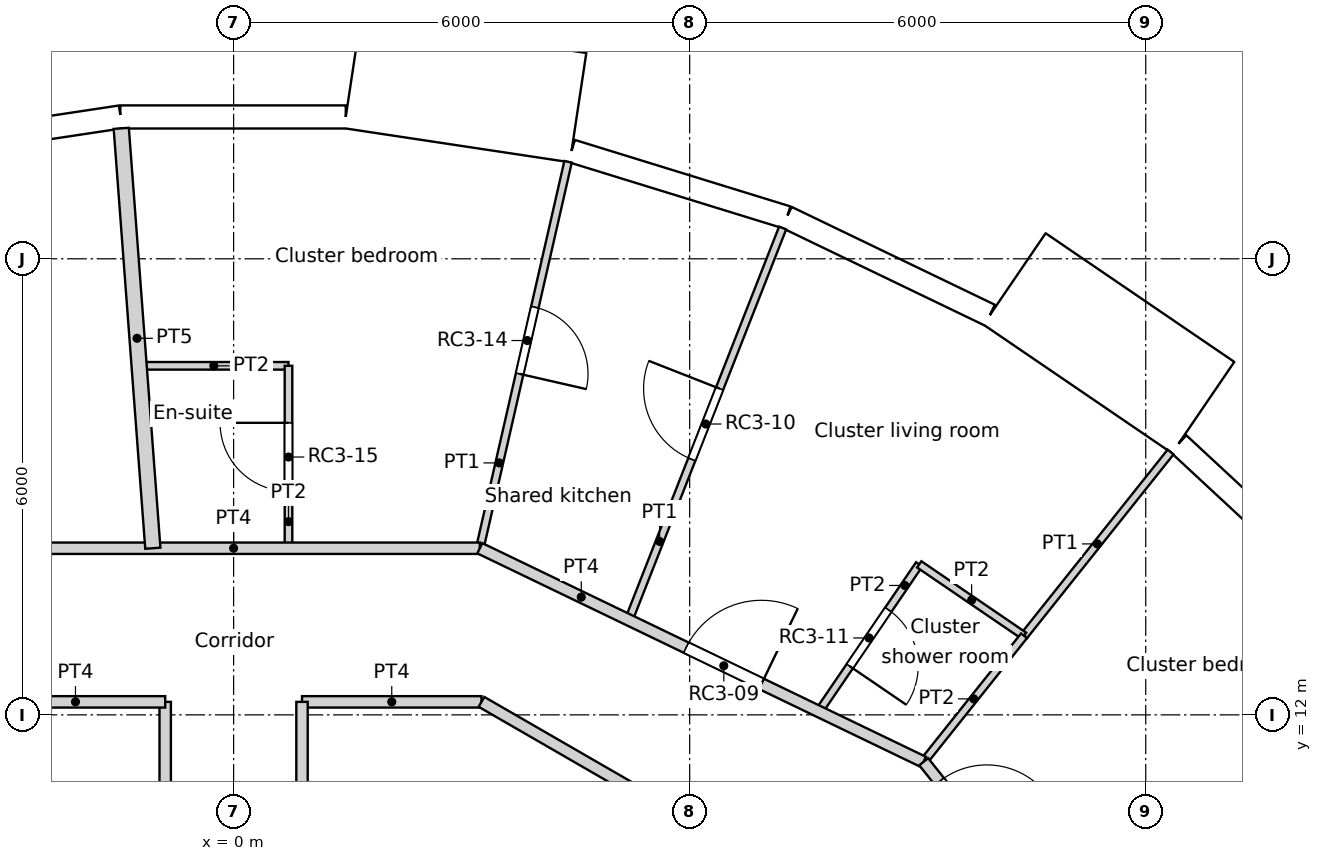
"""IFC4 building model, lengths in metres.
Left out: names, types, materials, properties, quantities, classifications, styles, units other than length and angle.
Written with IfcOpenShell. Run it as: python <this file> out.ifc"""

import sys

from ifc_helpers import new_model, si_unit, direction, frame, frame_2d, origin, origin_2d, place, context, subcontext, project, spatial, rectangle, circle, extrude, element, fill, save


model = new_model("IFC4")
c1 = context("Model", 3, precision=1e-05, world=origin(), true_north=direction((0.0, 1.0)))
c2 = subcontext(c1, "Body", "Model", "MODEL_VIEW")
j1 = project(units=[si_unit("LENGTHUNIT", "METRE"), si_unit("PLANEANGLEUNIT", "RADIAN")], contexts=[c1])
p1 = place(None, origin())
s1 = spatial("IfcSite", under=j1, at=p1, CompositionType="ELEMENT")
p2 = place(p1, origin())
s2 = spatial("IfcBuilding", under=s1, at=p2, CompositionType="ELEMENT")
p3 = place(p2, frame((0.0, 0.0, 252.6)))
s3 = spatial("IfcBuildingStorey", under=s2, at=p3, CompositionType="ELEMENT", Elevation=252.6)
for number, where, z_axis, x_axis in (
    (1, (11.735, 14.716, 0.0), (0.0, 0.0, 1.0), (1.0, 0.0, 0.0)),
    (2, (6.876, 17.521, 0.0), (0.0, 0.0, 1.0), (1.0, 0.0, 0.0)),
    (3, (1.406, 18.77, 0.0), (0.0, 0.0, 1.0), (1.0, 0.0, 0.0)),
):
    element("IfcColumn", number, at=place(p3, frame(where, z_axis=z_axis, x_axis=x_axis)), inside=s3, PredefinedType="COLUMN", context=c2, shape_type="SweptSolid", body=[
        extrude(circle(Radius=0.55, at=origin_2d()), origin(), (0.0, 0.0, 1.0), 3.6),
    ])
p4 = place(p3, frame((14.604, 13.55, 0.0), z_axis=(0.0, 0.0, 1.0), x_axis=(-0.733066412643, 0.680157066165, 0.0)))
e4 = element("IfcWall", 4, at=p4, inside=s3, PredefinedType="SOLIDWALL", context=c2, shape_type="SweptSolid", body=[
    extrude(rectangle(XDim=2.962, YDim=0.3, at=frame_2d((1.481, 0.0))), origin(), (0.0, 0.0, 1.0), 3.25),
])
p5 = place(p4, frame((1.481, 0.0, 1.55)))
e5 = element("IfcOpeningElement", 5, at=p5, cuts=e4, PredefinedType="OPENING", context=c2, shape_type="SweptSolid", body=[
    extrude(circle(Radius=0.9, at=origin_2d()), frame((0.0, 0.16, 0.0), z_axis=(0.0, -1.0, 0.0), x_axis=(1.0, 0.0, 0.0)), (0.0, 0.0, 1.0), 0.32),
])
p6 = place(p3, frame((12.754, 16.044, -0.35), z_axis=(0.0, 0.0, 1.0), x_axis=(-0.826246281157, 0.563309047392, 0.0)))
e6 = element("IfcWall", 6, at=p6, inside=s3, PredefinedType="ELEMENTEDWALL", context=c2, shape_type="SweptSolid", body=[
    extrude(rectangle(XDim=3.0, YDim=1.45, at=frame_2d((1.5, 0.0))), origin(), (0.0, 0.0, 1.0), 3.6),
])
p7 = place(p6, frame((1.5, 0.0, 1.9)))
e7 = element("IfcOpeningElement", 7, at=p7, cuts=e6, PredefinedType="OPENING", context=c2, shape_type="SweptSolid", body=[
    extrude(circle(Radius=0.9, at=origin_2d()), frame((0.0, 0.735, 0.0), z_axis=(0.0, -1.0, 0.0), x_axis=(1.0, 0.0, 0.0)), (0.0, 0.0, 1.0), 1.47),
])
p8 = place(p3, frame((9.947, 17.259, 0.0), z_axis=(0.0, 0.0, 1.0), x_axis=(-0.900939615635, 0.433944476838, 0.0)))
e8 = element("IfcWall", 8, at=p8, inside=s3, PredefinedType="SOLIDWALL", context=c2, shape_type="SweptSolid", body=[
    extrude(rectangle(XDim=2.962, YDim=0.3, at=frame_2d((1.481, 0.0))), origin(), (0.0, 0.0, 1.0), 3.25),
])
p9 = place(p8, frame((1.481, 0.0, 1.55)))
e9 = element("IfcOpeningElement", 9, at=p9, cuts=e8, PredefinedType="OPENING", context=c2, shape_type="SweptSolid", body=[
    extrude(circle(Radius=0.9, at=origin_2d()), frame((0.0, 0.16, 0.0), z_axis=(0.0, -1.0, 0.0), x_axis=(1.0, 0.0, 0.0)), (0.0, 0.0, 1.0), 0.32),
])
p10 = place(p3, frame((7.278, 18.545, 0.0), z_axis=(0.0, 0.0, 1.0), x_axis=(-0.95558635705, 0.294711238707, 0.0)))
e10 = element("IfcWall", 10, at=p10, inside=s3, PredefinedType="SOLIDWALL", context=c2, shape_type="SweptSolid", body=[
    extrude(rectangle(XDim=2.962, YDim=0.3, at=frame_2d((1.481, 0.0))), origin(), (0.0, 0.0, 1.0), 3.25),
])
p11 = place(p10, frame((1.481, 0.0, 1.55)))
e11 = element("IfcOpeningElement", 11, at=p11, cuts=e10, PredefinedType="OPENING", context=c2, shape_type="SweptSolid", body=[
    extrude(circle(Radius=0.9, at=origin_2d()), frame((0.0, 0.16, 0.0), z_axis=(0.0, -1.0, 0.0), x_axis=(1.0, 0.0, 0.0)), (0.0, 0.0, 1.0), 0.32),
])
p12 = place(p3, frame((4.53, 19.989, -0.35), z_axis=(0.0, 0.0, 1.0), x_axis=(-0.988836445254, 0.149004981587, 0.0)))
e12 = element("IfcWall", 12, at=p12, inside=s3, PredefinedType="ELEMENTEDWALL", context=c2, shape_type="SweptSolid", body=[
    extrude(rectangle(XDim=3.0, YDim=1.45, at=frame_2d((1.5, 0.0))), origin(), (0.0, 0.0, 1.0), 3.6),
])
p13 = place(p12, frame((1.5, 0.0, 1.9)))
e13 = element("IfcOpeningElement", 13, at=p13, cuts=e12, PredefinedType="OPENING", context=c2, shape_type="SweptSolid", body=[
    extrude(circle(Radius=0.9, at=origin_2d()), frame((0.0, 0.735, 0.0), z_axis=(0.0, -1.0, 0.0), x_axis=(1.0, 0.0, 0.0)), (0.0, 0.0, 1.0), 1.47),
])
p14 = place(p3, frame((1.473, 19.866, 0.0), z_axis=(0.0, 0.0, 1.0), x_axis=(-1.0, 0.0, 0.0)))
e14 = element("IfcWall", 14, at=p14, inside=s3, PredefinedType="SOLIDWALL", context=c2, shape_type="SweptSolid", body=[
    extrude(rectangle(XDim=2.962, YDim=0.3, at=frame_2d((1.481, 0.0))), origin(), (0.0, 0.0, 1.0), 3.25),
])
p15 = place(p14, frame((1.481, 0.0, 1.55)))
e15 = element("IfcOpeningElement", 15, at=p15, cuts=e14, PredefinedType="OPENING", context=c2, shape_type="SweptSolid", body=[
    extrude(circle(Radius=0.9, at=origin_2d()), frame((0.0, 0.16, 0.0), z_axis=(0.0, -1.0, 0.0), x_axis=(1.0, 0.0, 0.0)), (0.0, 0.0, 1.0), 0.32),
])
p16 = place(p3, frame((-1.489, 19.866, 0.0), z_axis=(0.0, 0.0, 1.0), x_axis=(-0.988835775663, -0.149009425104, 0.0)))
e16 = element("IfcWall", 16, at=p16, inside=s3, PredefinedType="SOLIDWALL", context=c2, shape_type="SweptSolid", body=[
    extrude(rectangle(XDim=2.962, YDim=0.3, at=frame_2d((1.481, 0.0))), origin(), (0.0, 0.0, 1.0), 3.25),
])
p17 = place(p16, frame((1.481, 0.0, 1.55)))
e17 = element("IfcOpeningElement", 17, at=p17, cuts=e16, PredefinedType="OPENING", context=c2, shape_type="SweptSolid", body=[
    extrude(circle(Radius=0.9, at=origin_2d()), frame((0.0, 0.16, 0.0), z_axis=(0.0, -1.0, 0.0), x_axis=(1.0, 0.0, 0.0)), (0.0, 0.0, 1.0), 0.32),
])
p18 = place(p3, frame((9.079, 11.384, 0.0), z_axis=(0.0, 0.0, 1.0), x_axis=(0.623165080354, -0.782090328944, 0.0)))
e18 = element("IfcWall", 18, at=p18, inside=s3, PredefinedType="PARTITIONING", context=c2, shape_type="SweptSolid", body=[
    extrude(rectangle(XDim=3.564, YDim=0.15, at=frame_2d((1.782, 0.0))), origin(), (0.0, 0.0, 1.0), 3.25),
])
p19 = place(p18, frame((0.332, 0.0, 0.0)))
e19 = element("IfcOpeningElement", 19, at=p19, cuts=e18, PredefinedType="OPENING", context=c2, shape_type="SweptSolid", body=[
    extrude(rectangle(XDim=1.0, YDim=2.1, at=frame_2d((0.5, 1.05))), frame((0.0, 0.075, 0.0), z_axis=(0.0, -1.0, 0.0), x_axis=(1.0, 0.0, 0.0)), (0.0, 0.0, 1.0), 0.15),
])
p20 = place(p3, frame((-0.9, 8.8, 0.0), z_axis=(0.0, 0.0, 1.0), x_axis=(0.0, 1.0, 0.0)))
e20 = element("IfcWall", 20, at=p20, inside=s3, PredefinedType="PARTITIONING", context=c2, shape_type="SweptSolid", body=[
    extrude(rectangle(XDim=3.371, YDim=0.15, at=frame_2d((1.686, 0.0))), origin(), (0.0, 0.0, 1.0), 3.25),
])
p21 = place(p3, frame((-3.261, 12.171, 0.0), z_axis=(0.0, 0.0, 1.0), x_axis=(1.0, 0.0, 0.0)))
e21 = element("IfcWall", 21, at=p21, inside=s3, PredefinedType="PARTITIONING", context=c2, shape_type="SweptSolid", body=[
    extrude(rectangle(XDim=2.361, YDim=0.15, at=frame_2d((1.181, 0.0))), origin(), (0.0, 0.0, 1.0), 3.25),
])
p22 = place(p3, frame((3.261, 12.171, 0.0), z_axis=(0.0, 0.0, 1.0), x_axis=(0.866066809554, -0.499928276245, 0.0)))
e22 = element("IfcWall", 22, at=p22, inside=s3, PredefinedType="PARTITIONING", context=c2, shape_type="SweptSolid", body=[
    extrude(rectangle(XDim=6.743, YDim=0.15, at=frame_2d((3.371, 0.0))), origin(), (0.0, 0.0, 1.0), 3.25),
])
p23 = place(p3, frame((0.9, 12.171, 0.0), z_axis=(0.0, 0.0, 1.0), x_axis=(1.0, 0.0, 0.0)))
e23 = element("IfcWall", 23, at=p23, inside=s3, PredefinedType="PARTITIONING", context=c2, shape_type="SweptSolid", body=[
    extrude(rectangle(XDim=2.361, YDim=0.15, at=frame_2d((1.181, 0.0))), origin(), (0.0, 0.0, 1.0), 3.25),
])
p24 = place(p3, frame((0.9, 8.8, 0.0), z_axis=(0.0, 0.0, 1.0), x_axis=(0.0, 1.0, 0.0)))
e24 = element("IfcWall", 24, at=p24, inside=s3, PredefinedType="PARTITIONING", context=c2, shape_type="SweptSolid", body=[
    extrude(rectangle(XDim=3.371, YDim=0.15, at=frame_2d((1.686, 0.0))), origin(), (0.0, 0.0, 1.0), 3.25),
])
p25 = place(p3, frame((3.239, 14.192, 0.0), z_axis=(0.0, 0.0, 1.0), x_axis=(0.90093183072, -0.433960639224, 0.0)))
e25 = element("IfcWall", 25, at=p25, inside=s3, PredefinedType="PARTITIONING", context=c2, shape_type="SweptSolid", body=[
    extrude(rectangle(XDim=6.479, YDim=0.15, at=frame_2d((3.239, 0.0))), origin(), (0.0, 0.0, 1.0), 3.25),
])
p26 = place(p25, frame((3.013, 0.0, 0.0)))
e26 = element("IfcOpeningElement", 26, at=p26, cuts=e25, PredefinedType="OPENING", context=c2, shape_type="SweptSolid", body=[
    extrude(rectangle(XDim=1.1, YDim=2.1, at=frame_2d((0.55, 1.05))), frame((0.0, 0.075, 0.0), z_axis=(0.0, -1.0, 0.0), x_axis=(1.0, 0.0, 0.0)), (0.0, 0.0, 1.0), 0.15),
])
p27 = place(p3, frame((-3.239, 14.192, 0.0), z_axis=(0.0, 0.0, 1.0), x_axis=(1.0, 0.0, 0.0)))
e27 = element("IfcWall", 27, at=p27, inside=s3, PredefinedType="PARTITIONING", context=c2, shape_type="SweptSolid", body=[
    extrude(rectangle(XDim=6.478, YDim=0.15, at=frame_2d((3.239, 0.0))), origin(), (0.0, 0.0, 1.0), 3.25),
])
p28 = place(p3, frame((5.199, 13.248, 0.0), z_axis=(0.0, 0.0, 1.0), x_axis=(0.365334662456, 0.930876245485, 0.0)))
e28 = element("IfcWall", 28, at=p28, inside=s3, PredefinedType="PARTITIONING", context=c2, shape_type="SweptSolid", body=[
    extrude(rectangle(XDim=5.54, YDim=0.1, at=frame_2d((2.77, 0.0))), origin(), (0.0, 0.0, 1.0), 3.25),
])
p29 = place(p28, frame((2.27, 0.0, 0.0)))
e29 = element("IfcOpeningElement", 29, at=p29, cuts=e28, PredefinedType="OPENING", context=c2, shape_type="SweptSolid", body=[
    extrude(rectangle(XDim=1.0, YDim=2.04, at=frame_2d((0.5, 1.02))), frame((0.0, 0.05, 0.0), z_axis=(0.0, -1.0, 0.0), x_axis=(1.0, 0.0, 0.0)), (0.0, 0.0, 1.0), 0.1),
])
p30 = place(p3, frame((9.02, 13.98, 0.0), z_axis=(0.0, 0.0, 1.0), x_axis=(0.826289240924, -0.563246030021, 0.0)))
e30 = element("IfcWall", 30, at=p30, inside=s3, PredefinedType="PARTITIONING", context=c2, shape_type="SweptSolid", body=[
    extrude(rectangle(XDim=1.669, YDim=0.1, at=frame_2d((0.834, 0.0))), origin(), (0.0, 0.0, 1.0), 3.25),
])
p31 = place(p3, frame((7.7, 12.044, 0.0), z_axis=(0.0, 0.0, 1.0), x_axis=(0.563349756349, 0.826218525586, 0.0)))
e31 = element("IfcWall", 31, at=p31, inside=s3, PredefinedType="PARTITIONING", context=c2, shape_type="SweptSolid", body=[
    extrude(rectangle(XDim=2.343, YDim=0.1, at=frame_2d((1.172, 0.0))), origin(), (0.0, 0.0, 1.0), 3.25),
])
p32 = place(p31, frame((0.721, 0.0, 0.0)))
e32 = element("IfcOpeningElement", 32, at=p32, cuts=e31, PredefinedType="OPENING", context=c2, shape_type="SweptSolid", body=[
    extrude(rectangle(XDim=0.9, YDim=2.0, at=frame_2d((0.45, 1.0))), frame((0.0, 0.05, 0.0), z_axis=(0.0, -1.0, 0.0), x_axis=(1.0, 0.0, 0.0)), (0.0, 0.0, 1.0), 0.1),
])
p33 = place(p3, frame((10.399, 13.04, 0.0), z_axis=(0.0, 0.0, 1.0), x_axis=(0.62343302941, 0.781876753613, 0.0)))
e33 = element("IfcWall", 33, at=p33, inside=s3, PredefinedType="PARTITIONING", context=c2, shape_type="SweptSolid", body=[
    extrude(rectangle(XDim=3.093, YDim=0.1, at=frame_2d((1.546, 0.0))), origin(), (0.0, 0.0, 1.0), 3.25),
])
p34 = place(p3, frame((3.239, 14.192, 0.0), z_axis=(0.0, 0.0, 1.0), x_axis=(0.222612505682, 0.974907007008, 0.0)))
e34 = element("IfcWall", 34, at=p34, inside=s3, PredefinedType="PARTITIONING", context=c2, shape_type="SweptSolid", body=[
    extrude(rectangle(XDim=5.215, YDim=0.1, at=frame_2d((2.607, 0.0))), origin(), (0.0, 0.0, 1.0), 3.25),
])
p35 = place(p34, frame((2.353, 0.0, 0.0)))
e35 = element("IfcOpeningElement", 35, at=p35, cuts=e34, PredefinedType="OPENING", context=c2, shape_type="SweptSolid", body=[
    extrude(rectangle(XDim=0.9, YDim=2.1, at=frame_2d((0.45, 1.05))), frame((0.0, 0.05, 0.0), z_axis=(0.0, -1.0, 0.0), x_axis=(1.0, 0.0, 0.0)), (0.0, 0.0, 1.0), 0.1),
])
p36 = place(p3, frame((9.076, 11.381, 0.0), z_axis=(0.0, 0.0, 1.0), x_axis=(0.623501640025, 0.781822041699, 0.0)))
e36 = element("IfcWall", 36, at=p36, inside=s3, PredefinedType="PARTITIONING", context=c2, shape_type="SweptSolid", body=[
    extrude(rectangle(XDim=2.122, YDim=0.1, at=frame_2d((1.061, 0.0))), origin(), (0.0, 0.0, 1.0), 3.25),
])
p37 = place(p3, frame((0.722, 14.192, 0.0), z_axis=(0.0, 0.0, 1.0), x_axis=(0.0, 1.0, 0.0)))
e37 = element("IfcWall", 37, at=p37, inside=s3, PredefinedType="PARTITIONING", context=c2, shape_type="SweptSolid", body=[
    extrude(rectangle(XDim=2.4, YDim=0.1, at=frame_2d((1.2, 0.0))), origin(), (0.0, 0.0, 1.0), 3.25),
])
p38 = place(p37, frame((0.75, 0.0, 0.0)))
e38 = element("IfcOpeningElement", 38, at=p38, cuts=e37, PredefinedType="OPENING", context=c2, shape_type="SweptSolid", body=[
    extrude(rectangle(XDim=0.9, YDim=2.04, at=frame_2d((0.45, 1.02))), frame((0.0, 0.05, 0.0), z_axis=(0.0, -1.0, 0.0), x_axis=(1.0, 0.0, 0.0)), (0.0, 0.0, 1.0), 0.1),
])
p39 = place(p3, frame((-1.243, 16.592, 0.0), z_axis=(0.0, 0.0, 1.0), x_axis=(1.0, 0.0, 0.0)))
e39 = element("IfcWall", 39, at=p39, inside=s3, PredefinedType="PARTITIONING", context=c2, shape_type="SweptSolid", body=[
    extrude(rectangle(XDim=1.965, YDim=0.1, at=frame_2d((0.982, 0.0))), origin(), (0.0, 0.0, 1.0), 3.25),
])
p40 = place(p3, frame((-1.478, 19.716, 0.0), z_axis=(0.0, 0.0, 1.0), x_axis=(0.075011267216, -0.997182686267, 0.0)))
e40 = element("IfcWall", 40, at=p40, inside=s3, PredefinedType="PARTITIONING", context=c2, shape_type="SweptSolid", body=[
    extrude(rectangle(XDim=5.54, YDim=0.2, at=frame_2d((2.77, 0.0))), origin(), (0.0, 0.0, 1.0), 3.25),
])
p41 = place(p5, origin())
e41 = element("IfcWindow", 41, at=p41, inside=s3, PartitioningType="SINGLE_PANEL", PredefinedType="WINDOW", context=c2, shape_type="SweptSolid", body=[
    extrude(circle(Radius=0.9, at=origin_2d()), frame((0.0, 0.12, 0.0), z_axis=(0.0, -1.0, 0.0), x_axis=(1.0, 0.0, 0.0)), (0.0, 0.0, 1.0), 0.1),
])
fill(e5, e41)
p42 = place(p7, origin())
e42 = element("IfcWindow", 42, at=p42, inside=s3, PartitioningType="SINGLE_PANEL", PredefinedType="WINDOW", context=c2, shape_type="SweptSolid", body=[
    extrude(circle(Radius=0.9, at=origin_2d()), frame((0.0, 0.695, 0.0), z_axis=(0.0, -1.0, 0.0), x_axis=(1.0, 0.0, 0.0)), (0.0, 0.0, 1.0), 0.1),
])
fill(e7, e42)
p43 = place(p9, origin())
e43 = element("IfcWindow", 43, at=p43, inside=s3, PartitioningType="SINGLE_PANEL", PredefinedType="WINDOW", context=c2, shape_type="SweptSolid", body=[
    extrude(circle(Radius=0.9, at=origin_2d()), frame((0.0, 0.12, 0.0), z_axis=(0.0, -1.0, 0.0), x_axis=(1.0, 0.0, 0.0)), (0.0, 0.0, 1.0), 0.1),
])
fill(e9, e43)
p44 = place(p11, origin())
e44 = element("IfcWindow", 44, at=p44, inside=s3, PartitioningType="SINGLE_PANEL", PredefinedType="WINDOW", context=c2, shape_type="SweptSolid", body=[
    extrude(circle(Radius=0.9, at=origin_2d()), frame((0.0, 0.12, 0.0), z_axis=(0.0, -1.0, 0.0), x_axis=(1.0, 0.0, 0.0)), (0.0, 0.0, 1.0), 0.1),
])
fill(e11, e44)
p45 = place(p13, origin())
e45 = element("IfcWindow", 45, at=p45, inside=s3, PartitioningType="SINGLE_PANEL", PredefinedType="WINDOW", context=c2, shape_type="SweptSolid", body=[
    extrude(circle(Radius=0.9, at=origin_2d()), frame((0.0, 0.695, 0.0), z_axis=(0.0, -1.0, 0.0), x_axis=(1.0, 0.0, 0.0)), (0.0, 0.0, 1.0), 0.1),
])
fill(e13, e45)
p46 = place(p15, origin())
e46 = element("IfcWindow", 46, at=p46, inside=s3, PartitioningType="SINGLE_PANEL", PredefinedType="WINDOW", context=c2, shape_type="SweptSolid", body=[
    extrude(circle(Radius=0.9, at=origin_2d()), frame((0.0, 0.12, 0.0), z_axis=(0.0, -1.0, 0.0), x_axis=(1.0, 0.0, 0.0)), (0.0, 0.0, 1.0), 0.1),
])
fill(e15, e46)
p47 = place(p17, origin())
e47 = element("IfcWindow", 47, at=p47, inside=s3, PartitioningType="SINGLE_PANEL", PredefinedType="WINDOW", context=c2, shape_type="SweptSolid", body=[
    extrude(circle(Radius=0.9, at=origin_2d()), frame((0.0, 0.12, 0.0), z_axis=(0.0, -1.0, 0.0), x_axis=(1.0, 0.0, 0.0)), (0.0, 0.0, 1.0), 0.1),
])
fill(e17, e47)
p48 = place(p26, origin())
e48 = element("IfcDoor", 48, at=p48, inside=s3, OperationType="SINGLE_SWING_RIGHT", PredefinedType="DOOR", context=c2, shape_type="SweptSolid", body=[
    extrude(rectangle(XDim=1.1, YDim=2.1, at=frame_2d((0.55, 1.05))), frame((0.0, 0.025, 0.0), z_axis=(0.0, -1.0, 0.0), x_axis=(1.0, 0.0, 0.0)), (0.0, 0.0, 1.0), 0.05),
])
fill(e26, e48)
p49 = place(p29, origin())
e49 = element("IfcDoor", 49, at=p49, inside=s3, OperationType="SINGLE_SWING_RIGHT", PredefinedType="DOOR", context=c2, shape_type="SweptSolid", body=[
    extrude(rectangle(XDim=1.0, YDim=2.04, at=frame_2d((0.5, 1.02))), frame((0.0, 0.025, 0.0), z_axis=(0.0, -1.0, 0.0), x_axis=(1.0, 0.0, 0.0)), (0.0, 0.0, 1.0), 0.05),
])
fill(e29, e49)
p50 = place(p32, origin())
e50 = element("IfcDoor", 50, at=p50, inside=s3, OperationType="SINGLE_SWING_RIGHT", PredefinedType="DOOR", context=c2, shape_type="SweptSolid", body=[
    extrude(rectangle(XDim=0.9, YDim=2.0, at=frame_2d((0.45, 1.0))), frame((0.0, 0.025, 0.0), z_axis=(0.0, -1.0, 0.0), x_axis=(1.0, 0.0, 0.0)), (0.0, 0.0, 1.0), 0.05),
])
fill(e32, e50)
p51 = place(p19, origin())
e51 = element("IfcDoor", 51, at=p51, inside=s3, OperationType="SINGLE_SWING_RIGHT", PredefinedType="DOOR", context=c2, shape_type="SweptSolid", body=[
    extrude(rectangle(XDim=1.0, YDim=2.1, at=frame_2d((0.5, 1.05))), frame((0.0, 0.025, 0.0), z_axis=(0.0, -1.0, 0.0), x_axis=(1.0, 0.0, 0.0)), (0.0, 0.0, 1.0), 0.05),
])
fill(e19, e51)
p52 = place(p35, origin())
e52 = element("IfcDoor", 52, at=p52, inside=s3, OperationType="SINGLE_SWING_RIGHT", PredefinedType="DOOR", context=c2, shape_type="SweptSolid", body=[
    extrude(rectangle(XDim=0.9, YDim=2.1, at=frame_2d((0.45, 1.05))), frame((0.0, 0.025, 0.0), z_axis=(0.0, -1.0, 0.0), x_axis=(1.0, 0.0, 0.0)), (0.0, 0.0, 1.0), 0.05),
])
fill(e35, e52)
p53 = place(p38, origin())
e53 = element("IfcDoor", 53, at=p53, inside=s3, OperationType="SINGLE_SWING_RIGHT", PredefinedType="DOOR", context=c2, shape_type="SweptSolid", body=[
    extrude(rectangle(XDim=0.9, YDim=2.04, at=frame_2d((0.45, 1.02))), frame((0.0, 0.025, 0.0), z_axis=(0.0, -1.0, 0.0), x_axis=(1.0, 0.0, 0.0)), (0.0, 0.0, 1.0), 0.05),
])
fill(e38, e53)
save(model, sys.argv[1])
